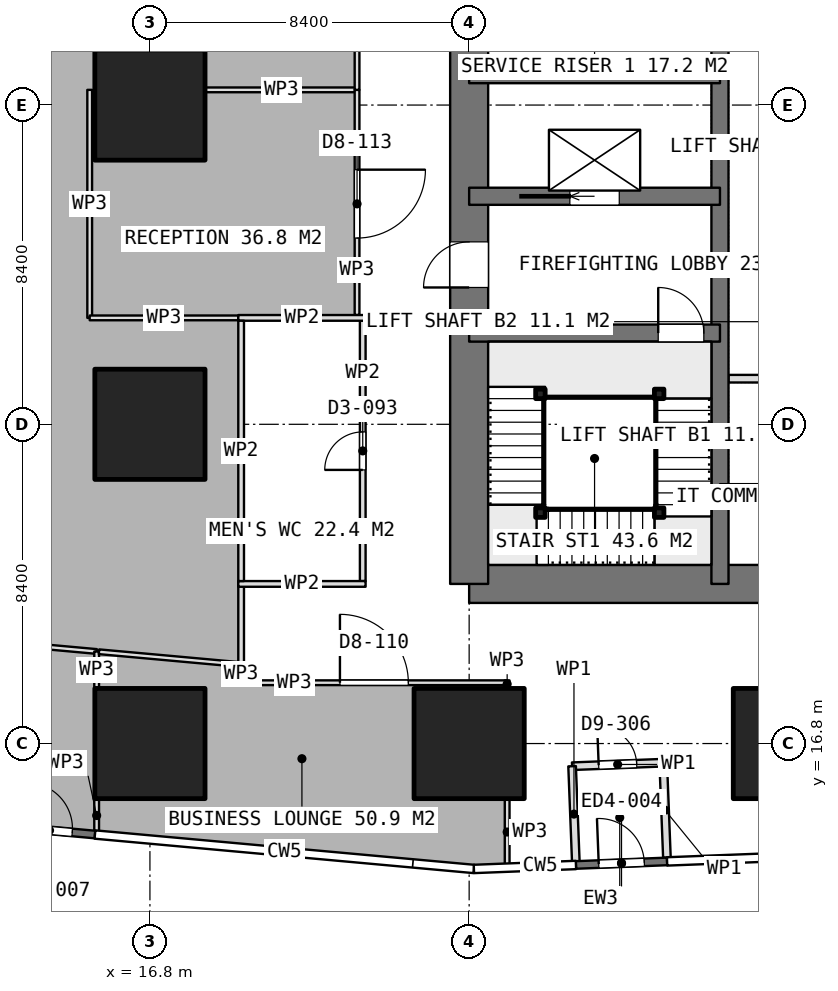
"""IFC4 building model, lengths in metres.
Left out: names, types, materials, properties, quantities, classifications, styles, units other than length and angle.
Written with IfcOpenShell. Run it as: python <this file> out.ifc"""

import sys

from ifc_helpers import new_model, si_unit, direction, frame, frame_2d, origin, origin_2d, place, context, subcontext, project, spatial, rectangle, extrude, element, fill, save


model = new_model("IFC4")
c1 = context("Model", 3, precision=1e-05, world=origin(), true_north=direction((0.0, 1.0)))
c2 = subcontext(c1, "Body", "Model", "MODEL_VIEW")
j1 = project(units=[si_unit("LENGTHUNIT", "METRE"), si_unit("PLANEANGLEUNIT", "RADIAN")], contexts=[c1])
p1 = place(None, origin())
s1 = spatial("IfcSite", under=j1, at=p1, CompositionType="ELEMENT")
p2 = place(p1, origin())
s2 = spatial("IfcBuilding", under=s1, at=p2, CompositionType="ELEMENT")
p3 = place(p2, frame((0.0, 0.0, 90.8)))
s3 = spatial("IfcBuildingStorey", under=s2, at=p3, CompositionType="ELEMENT", Elevation=90.8)
p4 = place(p3, frame((25.2, 21.0, 0.0), z_axis=(0.0, 0.0, 1.0), x_axis=(1.0, 0.0, 0.0)))
e1 = element("IfcWall", 1, at=p4, inside=s3, PredefinedType="SHEAR", context=c2, shape_type="SweptSolid", body=[
    extrude(rectangle(XDim=10.4, YDim=1.0, at=frame_2d((5.2, 0.0))), origin(), (0.0, 0.0, 1.0), 4.5),
])
p5 = place(p3, frame((25.2, 21.0, 0.0), z_axis=(0.0, 0.0, 1.0), x_axis=(0.0, 1.0, 0.0)))
e2 = element("IfcWall", 2, at=p5, inside=s3, PredefinedType="SHEAR", context=c2, shape_type="SweptSolid", body=[
    extrude(rectangle(XDim=25.2, YDim=1.0, at=frame_2d((12.6, 0.0))), origin(), (0.0, 0.0, 1.0), 4.5),
])
p6 = place(p5, frame((7.8, 0.0, 0.0)))
e3 = element("IfcOpeningElement", 3, at=p6, cuts=e2, PredefinedType="OPENING", context=c2, shape_type="SweptSolid", body=[
    extrude(rectangle(XDim=1.2, YDim=2.1, at=frame_2d((0.6, 1.05))), frame((0.0, 0.51, 0.0), z_axis=(0.0, -1.0, 0.0), x_axis=(1.0, 0.0, 0.0)), (0.0, 0.0, 1.0), 1.02),
])
p7 = place(p5, frame((14.25, 0.0, 0.0)))
e4 = element("IfcOpeningElement", 4, at=p7, cuts=e2, PredefinedType="OPENING", context=c2, shape_type="SweptSolid", body=[
    extrude(rectangle(XDim=0.9, YDim=2.1, at=frame_2d((0.45, 1.05))), frame((0.0, 0.51, 0.0), z_axis=(0.0, -1.0, 0.0), x_axis=(1.0, 0.0, 0.0)), (0.0, 0.0, 1.0), 1.02),
])
p8 = place(p5, frame((16.85, 0.0, 0.0)))
e5 = element("IfcOpeningElement", 5, at=p8, cuts=e2, PredefinedType="OPENING", context=c2, shape_type="SweptSolid", body=[
    extrude(rectangle(XDim=0.9, YDim=2.1, at=frame_2d((0.45, 1.05))), frame((0.0, 0.51, 0.0), z_axis=(0.0, -1.0, 0.0), x_axis=(1.0, 0.0, 0.0)), (0.0, 0.0, 1.0), 1.02),
])
p9 = place(p5, frame((19.025, 0.0, 0.0)))
e6 = element("IfcOpeningElement", 6, at=p9, cuts=e2, PredefinedType="OPENING", context=c2, shape_type="SweptSolid", body=[
    extrude(rectangle(XDim=1.2, YDim=2.1, at=frame_2d((0.6, 1.05))), frame((0.0, 0.51, 0.0), z_axis=(0.0, -1.0, 0.0), x_axis=(1.0, 0.0, 0.0)), (0.0, 0.0, 1.0), 1.02),
])
p10 = place(p3, frame((31.8, 21.0, 0.0), z_axis=(0.0, 0.0, 1.0), x_axis=(0.0, 1.0, 0.0)))
e7 = element("IfcWall", 7, at=p10, inside=s3, PredefinedType="SHEAR", context=c2, shape_type="SweptSolid", body=[
    extrude(rectangle(XDim=25.2, YDim=0.45, at=frame_2d((12.6, 0.0))), origin(), (0.0, 0.0, 1.0), 4.5),
])
p11 = place(p3, frame((31.8, 23.4, 0.0), z_axis=(0.0, 0.0, 1.0), x_axis=(1.0, 0.0, 0.0)))
e8 = element("IfcWall", 8, at=p11, inside=s3, PredefinedType="SHEAR", context=c2, shape_type="SweptSolid", body=[
    extrude(rectangle(XDim=3.8, YDim=0.45, at=frame_2d((1.9, 0.0))), origin(), (0.0, 0.0, 1.0), 4.5),
])
p12 = place(p3, frame((25.2, 27.6, 0.0), z_axis=(0.0, 0.0, 1.0), x_axis=(1.0, 0.0, 0.0)))
e9 = element("IfcWall", 9, at=p12, inside=s3, PredefinedType="SHEAR", context=c2, shape_type="SweptSolid", body=[
    extrude(rectangle(XDim=6.6, YDim=0.45, at=frame_2d((3.3, 0.0))), origin(), (0.0, 0.0, 1.0), 4.5),
])
p13 = place(p12, frame((4.975, 0.0, 0.0)))
e10 = element("IfcOpeningElement", 10, at=p13, cuts=e9, PredefinedType="OPENING", context=c2, shape_type="SweptSolid", body=[
    extrude(rectangle(XDim=1.2, YDim=2.1, at=frame_2d((0.6, 1.05))), frame((0.0, 0.235, 0.0), z_axis=(0.0, -1.0, 0.0), x_axis=(1.0, 0.0, 0.0)), (0.0, 0.0, 1.0), 0.47),
])
p14 = place(p3, frame((25.2, 31.2, 0.0), z_axis=(0.0, 0.0, 1.0), x_axis=(1.0, 0.0, 0.0)))
e11 = element("IfcWall", 11, at=p14, inside=s3, PredefinedType="SHEAR", context=c2, shape_type="SweptSolid", body=[
    extrude(rectangle(XDim=6.6, YDim=0.45, at=frame_2d((3.3, 0.0))), origin(), (0.0, 0.0, 1.0), 4.5),
])
p15 = place(p14, frame((2.65, 0.0, 0.0)))
e12 = element("IfcOpeningElement", 12, at=p15, cuts=e11, PredefinedType="OPENING", context=c2, shape_type="SweptSolid", body=[
    extrude(rectangle(XDim=1.3, YDim=2.1, at=frame_2d((0.65, 1.05))), frame((0.0, 0.235, 0.0), z_axis=(0.0, -1.0, 0.0), x_axis=(1.0, 0.0, 0.0)), (0.0, 0.0, 1.0), 0.47),
])
p16 = place(p3, frame((25.2, 34.4, 0.0), z_axis=(0.0, 0.0, 1.0), x_axis=(1.0, 0.0, 0.0)))
e13 = element("IfcWall", 13, at=p16, inside=s3, PredefinedType="SHEAR", context=c2, shape_type="SweptSolid", body=[
    extrude(rectangle(XDim=6.6, YDim=0.45, at=frame_2d((3.3, 0.0))), origin(), (0.0, 0.0, 1.0), 4.5),
])
for number, where, z_axis, x_axis in (
    (14, (16.8, 16.8, 0.0), (0.0, 0.0, 1.0), (1.0, 0.0, 0.0)),
    (15, (16.8, 25.2, 0.0), (0.0, 0.0, 1.0), (1.0, 0.0, 0.0)),
    (16, (16.8, 33.6, 0.0), (0.0, 0.0, 1.0), (1.0, 0.0, 0.0)),
    (17, (25.2, 16.8, 0.0), (0.0, 0.0, 1.0), (1.0, 0.0, 0.0)),
    (18, (33.6, 16.8, 0.0), (0.0, 0.0, 1.0), (1.0, 0.0, 0.0)),
):
    element("IfcColumn", number, at=place(p3, frame(where, z_axis=z_axis, x_axis=x_axis)), inside=s3, PredefinedType="COLUMN", context=c2, shape_type="SweptSolid", body=[
        extrude(rectangle(XDim=2.9, YDim=2.9, at=origin_2d()), origin(), (0.0, 0.0, 1.0), 4.5),
    ])
p17 = place(p3, frame((11.171, 14.786, 0.0), z_axis=(0.0, 0.0, 1.0), x_axis=(0.995906536502, -0.090388995754, 0.0)))
e19 = element("IfcWall", 19, at=p17, inside=s3, PredefinedType="SOLIDWALL", context=c2, shape_type="SweptSolid", body=[
    extrude(rectangle(XDim=4.2, YDim=0.2, at=frame_2d((2.1, 0.0))), origin(), (0.0, 0.0, 1.0), 4.25),
])
p18 = place(p17, frame((0.6, 0.0, 0.0)))
e20 = element("IfcOpeningElement", 20, at=p18, cuts=e19, PredefinedType="OPENING", context=c2, shape_type="SweptSolid", body=[
    extrude(rectangle(XDim=1.2, YDim=2.4, at=frame_2d((0.6, 1.2))), frame((0.0, 0.11, 0.0), z_axis=(0.0, -1.0, 0.0), x_axis=(1.0, 0.0, 0.0)), (0.0, 0.0, 1.0), 0.22),
])
p19 = place(p17, frame((2.4, 0.0, 0.0)))
e21 = element("IfcOpeningElement", 21, at=p19, cuts=e19, PredefinedType="OPENING", context=c2, shape_type="SweptSolid", body=[
    extrude(rectangle(XDim=1.2, YDim=2.4, at=frame_2d((0.6, 1.2))), frame((0.0, 0.11, 0.0), z_axis=(0.0, -1.0, 0.0), x_axis=(1.0, 0.0, 0.0)), (0.0, 0.0, 1.0), 0.22),
])
p20 = place(p3, frame((28.01, 13.605, 0.0), z_axis=(0.0, 0.0, 1.0), x_axis=(0.999240750633, 0.038960521988, 0.0)))
e22 = element("IfcWall", 22, at=p20, inside=s3, PredefinedType="SOLIDWALL", context=c2, shape_type="SweptSolid", body=[
    extrude(rectangle(XDim=2.4, YDim=0.2, at=frame_2d((1.2, 0.0))), origin(), (0.0, 0.0, 1.0), 4.25),
])
p21 = place(p20, frame((0.6, 0.0, 0.0)))
e23 = element("IfcOpeningElement", 23, at=p21, cuts=e22, PredefinedType="OPENING", context=c2, shape_type="SweptSolid", body=[
    extrude(rectangle(XDim=1.2, YDim=2.4, at=frame_2d((0.6, 1.2))), frame((0.0, 0.11, 0.0), z_axis=(0.0, -1.0, 0.0), x_axis=(1.0, 0.0, 0.0)), (0.0, 0.0, 1.0), 0.22),
])
for number, where, z_axis, x_axis in (
    (24, (32.025, 26.4, 0.0), (0.0, 0.0, 1.0), (1.0, 0.0, 0.0)),
    (25, (32.025, 29.4, 0.0), (0.0, 0.0, 1.0), (1.0, 0.0, 0.0)),
    (26, (32.025, 32.4, 0.0), (0.0, 0.0, 1.0), (1.0, 0.0, 0.0)),
):
    element("IfcWall", number, at=place(p3, frame(where, z_axis=z_axis, x_axis=x_axis)), inside=s3, PredefinedType="PARTITIONING", context=c2, shape_type="SweptSolid", body=[
        extrude(rectangle(XDim=3.075, YDim=0.2, at=frame_2d((1.538, 0.0))), origin(), (0.0, 0.0, 1.0), 4.25),
    ])
for number, where, z_axis, x_axis in (
    (27, (19.125, 21.0, 0.0), (0.0, 0.0, 1.0), (1.0, 0.0, 0.0)),
    (28, (19.125, 28.0, 0.0), (0.0, 0.0, 1.0), (1.0, 0.0, 0.0)),
):
    element("IfcWall", number, at=place(p3, frame(where, z_axis=z_axis, x_axis=x_axis)), inside=s3, PredefinedType="PARTITIONING", context=c2, shape_type="SweptSolid", body=[
        extrude(rectangle(XDim=3.35, YDim=0.15, at=frame_2d((1.675, 0.0))), origin(), (0.0, 0.0, 1.0), 4.25),
    ])
p22 = place(p3, frame((19.2, 21.075, 0.0), z_axis=(0.0, 0.0, 1.0), x_axis=(0.0, 1.0, 0.0)))
e29 = element("IfcWall", 29, at=p22, inside=s3, PredefinedType="PARTITIONING", context=c2, shape_type="SweptSolid", body=[
    extrude(rectangle(XDim=6.85, YDim=0.15, at=frame_2d((3.425, 0.0))), origin(), (0.0, 0.0, 1.0), 4.25),
])
p23 = place(p3, frame((22.4, 21.075, 0.0), z_axis=(0.0, 0.0, 1.0), x_axis=(0.0, 1.0, 0.0)))
e30 = element("IfcWall", 30, at=p23, inside=s3, PredefinedType="PARTITIONING", context=c2, shape_type="SweptSolid", body=[
    extrude(rectangle(XDim=6.85, YDim=0.15, at=frame_2d((3.425, 0.0))), origin(), (0.0, 0.0, 1.0), 4.25),
])
p24 = place(p23, frame((2.925, 0.0, 0.0)))
e31 = element("IfcOpeningElement", 31, at=p24, cuts=e30, PredefinedType="OPENING", context=c2, shape_type="SweptSolid", body=[
    extrude(rectangle(XDim=1.0, YDim=2.1, at=frame_2d((0.5, 1.05))), frame((0.0, 0.085, 0.0), z_axis=(0.0, -1.0, 0.0), x_axis=(1.0, 0.0, 0.0)), (0.0, 0.0, 1.0), 0.17),
])
p25 = place(p3, frame((10.998, 19.621, 0.0), z_axis=(0.0, 0.0, 1.0), x_axis=(0.995909948824, -0.090351390874, 0.0)))
e32 = element("IfcWall", 32, at=p25, inside=s3, PredefinedType="PARTITIONING", context=c2, shape_type="SweptSolid", body=[
    extrude(rectangle(XDim=4.418, YDim=0.125, at=frame_2d((2.209, 0.0))), origin(), (0.0, 0.0, 1.0), 4.25),
])
p26 = place(p3, frame((15.398, 19.222, 0.0), z_axis=(0.0, 0.0, 1.0), x_axis=(0.0, -1.0, 0.0)))
e33 = element("IfcWall", 33, at=p26, inside=s3, PredefinedType="PARTITIONING", context=c2, shape_type="SweptSolid", body=[
    extrude(rectangle(XDim=0.952, YDim=0.125, at=frame_2d((0.476, 0.0))), origin(), (0.0, 0.0, 1.0), 4.25),
])
p27 = place(p3, frame((15.398, 15.33, 0.0), z_axis=(0.0, 0.0, 1.0), x_axis=(0.0, -1.0, 0.0)))
e34 = element("IfcWall", 34, at=p27, inside=s3, PredefinedType="PARTITIONING", context=c2, shape_type="SweptSolid", body=[
    extrude(rectangle(XDim=0.848, YDim=0.125, at=frame_2d((0.424, 0.0))), origin(), (0.0, 0.0, 1.0), 4.25),
])
p28 = place(p3, frame((15.46, 19.215, 0.0), z_axis=(0.0, 0.0, 1.0), x_axis=(0.995914494184, -0.090301275045, 0.0)))
e35 = element("IfcWall", 35, at=p28, inside=s3, PredefinedType="PARTITIONING", context=c2, shape_type="SweptSolid", body=[
    extrude(rectangle(XDim=3.755, YDim=0.125, at=frame_2d((1.878, 0.0))), origin(), (0.0, 0.0, 1.0), 4.25),
])
p29 = place(p3, frame((19.2, 18.876, 0.0), z_axis=(0.0, 0.0, 1.0), x_axis=(0.0, -1.0, 0.0)))
e36 = element("IfcWall", 36, at=p29, inside=s3, PredefinedType="PARTITIONING", context=c2, shape_type="SweptSolid", body=[
    extrude(rectangle(XDim=0.476, YDim=0.125, at=frame_2d((0.238, 0.0))), origin(), (0.0, 0.0, 1.0), 4.25),
])
p30 = place(p3, frame((19.2, 18.4, 0.0), z_axis=(0.0, 0.0, 1.0), x_axis=(1.0, 0.0, 0.0)))
e37 = element("IfcWall", 37, at=p30, inside=s3, PredefinedType="PARTITIONING", context=c2, shape_type="SweptSolid", body=[
    extrude(rectangle(XDim=7.0, YDim=0.125, at=frame_2d((3.5, 0.0))), origin(), (0.0, 0.0, 1.0), 4.25),
])
p31 = place(p30, frame((2.6, 0.0, 0.0)))
e38 = element("IfcOpeningElement", 38, at=p31, cuts=e37, PredefinedType="OPENING", context=c2, shape_type="SweptSolid", body=[
    extrude(rectangle(XDim=1.8, YDim=2.1, at=frame_2d((0.9, 1.05))), frame((0.0, 0.073, 0.0), z_axis=(0.0, -1.0, 0.0), x_axis=(1.0, 0.0, 0.0)), (0.0, 0.0, 1.0), 0.145),
])
p32 = place(p3, frame((26.2, 15.33, 0.0), z_axis=(0.0, 0.0, 1.0), x_axis=(0.0, -1.0, 0.0)))
e39 = element("IfcWall", 39, at=p32, inside=s3, PredefinedType="PARTITIONING", context=c2, shape_type="SweptSolid", body=[
    extrude(rectangle(XDim=1.716, YDim=0.125, at=frame_2d((0.858, 0.0))), origin(), (0.0, 0.0, 1.0), 4.25),
])
p33 = place(p3, frame((15.215, 28.0, 0.0), z_axis=(0.0, 0.0, 1.0), x_axis=(0.0, 1.0, 0.0)))
e40 = element("IfcWall", 40, at=p33, inside=s3, PredefinedType="PARTITIONING", context=c2, shape_type="SweptSolid", body=[
    extrude(rectangle(XDim=6.0, YDim=0.125, at=frame_2d((3.0, 0.0))), origin(), (0.0, 0.0, 1.0), 4.25),
])
p34 = place(p3, frame((18.27, 34.0, 0.0), z_axis=(0.0, 0.0, 1.0), x_axis=(1.0, 0.0, 0.0)))
e41 = element("IfcWall", 41, at=p34, inside=s3, PredefinedType="PARTITIONING", context=c2, shape_type="SweptSolid", body=[
    extrude(rectangle(XDim=3.98, YDim=0.125, at=frame_2d((1.99, 0.0))), origin(), (0.0, 0.0, 1.0), 4.25),
])
p35 = place(p3, frame((22.25, 34.0, 0.0), z_axis=(0.0, 0.0, 1.0), x_axis=(0.0, -1.0, 0.0)))
e42 = element("IfcWall", 42, at=p35, inside=s3, PredefinedType="PARTITIONING", context=c2, shape_type="SweptSolid", body=[
    extrude(rectangle(XDim=5.925, YDim=0.125, at=frame_2d((2.962, 0.0))), origin(), (0.0, 0.0, 1.0), 4.25),
])
p36 = place(p35, frame((2.1, 0.0, 0.0)))
e43 = element("IfcOpeningElement", 43, at=p36, cuts=e42, PredefinedType="OPENING", context=c2, shape_type="SweptSolid", body=[
    extrude(rectangle(XDim=1.8, YDim=2.1, at=frame_2d((0.9, 1.05))), frame((0.0, 0.073, 0.0), z_axis=(0.0, -1.0, 0.0), x_axis=(1.0, 0.0, 0.0)), (0.0, 0.0, 1.0), 0.145),
])
p37 = place(p3, frame((19.125, 28.0, 0.0), z_axis=(0.0, 0.0, 1.0), x_axis=(-1.0, 0.0, 0.0)))
e44 = element("IfcWall", 44, at=p37, inside=s3, PredefinedType="PARTITIONING", context=c2, shape_type="SweptSolid", body=[
    extrude(rectangle(XDim=3.91, YDim=0.125, at=frame_2d((1.955, 0.0))), origin(), (0.0, 0.0, 1.0), 4.25),
])
p38 = place(p3, frame((22.25, 37.0, 0.0), z_axis=(0.0, 0.0, 1.0), x_axis=(0.0, -1.0, 0.0)))
e45 = element("IfcWall", 45, at=p38, inside=s3, PredefinedType="PARTITIONING", context=c2, shape_type="SweptSolid", body=[
    extrude(rectangle(XDim=3.0, YDim=0.125, at=frame_2d((1.5, 0.0))), origin(), (0.0, 0.0, 1.0), 4.25),
])
p39 = place(p3, frame((19.2, 21.075, 0.0), z_axis=(0.0, 0.0, 1.0), x_axis=(0.0, -1.0, 0.0)))
e46 = element("IfcWall", 46, at=p39, inside=s3, PredefinedType="PARTITIONING", context=c2, shape_type="SweptSolid", body=[
    extrude(rectangle(XDim=2.199, YDim=0.15, at=frame_2d((1.1, 0.0))), origin(), (0.0, 0.0, 1.0), 4.25),
])
p40 = place(p3, frame((27.909, 16.203, 0.0), z_axis=(0.0, 0.0, 1.0), x_axis=(0.999248497687, 0.038761319244, 0.0)))
e47 = element("IfcWall", 47, at=p40, inside=s3, PredefinedType="PARTITIONING", context=c2, shape_type="SweptSolid", body=[
    extrude(rectangle(XDim=2.4, YDim=0.2, at=frame_2d((1.2, 0.0))), origin(), (0.0, 0.0, 1.0), 4.25),
])
p41 = place(p40, frame((0.7, 0.0, 0.0)))
e48 = element("IfcOpeningElement", 48, at=p41, cuts=e47, PredefinedType="OPENING", context=c2, shape_type="SweptSolid", body=[
    extrude(rectangle(XDim=1.0, YDim=2.1, at=frame_2d((0.5, 1.05))), frame((0.0, 0.11, 0.0), z_axis=(0.0, -1.0, 0.0), x_axis=(1.0, 0.0, 0.0)), (0.0, 0.0, 1.0), 0.22),
])
p42 = place(p3, frame((30.307, 16.296, 0.0), z_axis=(0.0, 0.0, 1.0), x_axis=(0.038871976468, -0.999244199105, 0.0)))
e49 = element("IfcWall", 49, at=p42, inside=s3, PredefinedType="PARTITIONING", context=c2, shape_type="SweptSolid", body=[
    extrude(rectangle(XDim=2.5, YDim=0.2, at=frame_2d((1.25, 0.0))), origin(), (0.0, 0.0, 1.0), 4.25),
])
p43 = place(p3, frame((28.007, 13.684, 0.0), z_axis=(0.0, 0.0, 1.0), x_axis=(-0.038935269694, 0.999241734904, 0.0)))
e50 = element("IfcWall", 50, at=p43, inside=s3, PredefinedType="PARTITIONING", context=c2, shape_type="SweptSolid", body=[
    extrude(rectangle(XDim=2.521, YDim=0.2, at=frame_2d((1.26, 0.0))), origin(), (0.0, 0.0, 1.0), 4.25),
])
p44 = place(p3, frame((26.2, 18.462, 0.0), z_axis=(0.0, 0.0, 1.0), x_axis=(0.0, -1.0, 0.0)))
e51 = element("IfcWall", 51, at=p44, inside=s3, PredefinedType="PARTITIONING", context=c2, shape_type="SweptSolid", body=[
    extrude(rectangle(XDim=0.192, YDim=0.125, at=frame_2d((0.096, 0.0))), origin(), (0.0, 0.0, 1.0), 4.25),
])
for number, where, z_axis, x_axis in (
    (52, (30.2, 26.0, 0.0), (0.0, 0.0, 1.0), (1.0, 0.0, 0.0)),
    (53, (30.2, 22.875, 0.0), (0.0, 0.0, 1.0), (1.0, 0.0, 0.0)),
    (54, (27.075, 22.875, 0.0), (0.0, 0.0, 1.0), (1.0, 0.0, 0.0)),
    (55, (27.075, 26.0, 0.0), (0.0, 0.0, 1.0), (1.0, 0.0, 0.0)),
):
    element("IfcColumn", number, at=place(p3, frame(where, z_axis=z_axis, x_axis=x_axis)), inside=s3, PredefinedType="COLUMN", context=c2, shape_type="SweptSolid", body=[
        extrude(rectangle(XDim=0.25, YDim=0.25, at=origin_2d()), origin(), (0.0, 0.0, 1.0), 4.5),
    ])
p45 = place(p19, origin())
e56 = element("IfcDoor", 56, at=p45, inside=s3, OperationType="SINGLE_SWING_LEFT", PredefinedType="DOOR", context=c2, shape_type="SweptSolid", body=[
    extrude(rectangle(XDim=1.2, YDim=2.4, at=frame_2d((0.6, 1.2))), frame((0.0, 0.025, 0.0), z_axis=(0.0, -1.0, 0.0), x_axis=(1.0, 0.0, 0.0)), (0.0, 0.0, 1.0), 0.05),
])
fill(e21, e56)
p46 = place(p21, origin())
e57 = element("IfcDoor", 57, at=p46, inside=s3, OperationType="SINGLE_SWING_LEFT", PredefinedType="DOOR", context=c2, shape_type="SweptSolid", body=[
    extrude(rectangle(XDim=1.2, YDim=2.4, at=frame_2d((0.6, 1.2))), frame((0.0, 0.025, 0.0), z_axis=(0.0, -1.0, 0.0), x_axis=(1.0, 0.0, 0.0)), (0.0, 0.0, 1.0), 0.05),
])
fill(e23, e57)
p47 = place(p6, origin())
e58 = element("IfcDoor", 58, at=p47, inside=s3, OperationType="SINGLE_SWING_LEFT", PredefinedType="DOOR", context=c2, shape_type="SweptSolid", body=[
    extrude(rectangle(XDim=1.2, YDim=2.1, at=frame_2d((0.6, 1.05))), frame((0.0, 0.025, 0.0), z_axis=(0.0, -1.0, 0.0), x_axis=(1.0, 0.0, 0.0)), (0.0, 0.0, 1.0), 0.05),
])
fill(e3, e58)
p48 = place(p15, origin())
e59 = element("IfcDoor", 59, at=p48, inside=s3, OperationType="SLIDING_TO_LEFT", PredefinedType="USERDEFINED", context=c2, shape_type="SweptSolid", body=[
    extrude(rectangle(XDim=1.3, YDim=2.1, at=frame_2d((0.65, 1.05))), frame((0.0, 0.025, 0.0), z_axis=(0.0, -1.0, 0.0), x_axis=(1.0, 0.0, 0.0)), (0.0, 0.0, 1.0), 0.05),
])
fill(e12, e59)
p49 = place(p24, origin())
e60 = element("IfcDoor", 60, at=p49, inside=s3, OperationType="SINGLE_SWING_LEFT", PredefinedType="DOOR", context=c2, shape_type="SweptSolid", body=[
    extrude(rectangle(XDim=1.0, YDim=2.1, at=frame_2d((0.5, 1.05))), frame((0.0, 0.025, 0.0), z_axis=(0.0, -1.0, 0.0), x_axis=(1.0, 0.0, 0.0)), (0.0, 0.0, 1.0), 0.05),
])
fill(e31, e60)
p50 = place(p31, origin())
e61 = element("IfcDoor", 61, at=p50, inside=s3, OperationType="DOUBLE_DOOR_SINGLE_SWING", PredefinedType="DOOR", context=c2, shape_type="SweptSolid", body=[
    extrude(rectangle(XDim=1.8, YDim=2.1, at=frame_2d((0.9, 1.05))), frame((0.0, 0.025, 0.0), z_axis=(0.0, -1.0, 0.0), x_axis=(1.0, 0.0, 0.0)), (0.0, 0.0, 1.0), 0.05),
])
fill(e38, e61)
p51 = place(p36, origin())
e62 = element("IfcDoor", 62, at=p51, inside=s3, OperationType="DOUBLE_DOOR_SINGLE_SWING", PredefinedType="DOOR", context=c2, shape_type="SweptSolid", body=[
    extrude(rectangle(XDim=1.8, YDim=2.1, at=frame_2d((0.9, 1.05))), frame((0.0, 0.025, 0.0), z_axis=(0.0, -1.0, 0.0), x_axis=(1.0, 0.0, 0.0)), (0.0, 0.0, 1.0), 0.05),
])
fill(e43, e62)
p52 = place(p41, origin())
e63 = element("IfcDoor", 63, at=p52, inside=s3, OperationType="SINGLE_SWING_LEFT", PredefinedType="DOOR", context=c2, shape_type="SweptSolid", body=[
    extrude(rectangle(XDim=1.0, YDim=2.1, at=frame_2d((0.5, 1.05))), frame((0.0, 0.025, 0.0), z_axis=(0.0, -1.0, 0.0), x_axis=(1.0, 0.0, 0.0)), (0.0, 0.0, 1.0), 0.05),
])
fill(e48, e63)
p53 = place(p13, origin())
e64 = element("IfcDoor", 64, at=p53, inside=s3, OperationType="SINGLE_SWING_RIGHT", PredefinedType="DOOR", context=c2, shape_type="SweptSolid", body=[
    extrude(rectangle(XDim=1.2, YDim=2.1, at=frame_2d((0.6, 1.05))), frame((0.0, 0.025, 0.0), z_axis=(0.0, -1.0, 0.0), x_axis=(1.0, 0.0, 0.0)), (0.0, 0.0, 1.0), 0.05),
])
fill(e10, e64)
save(model, sys.argv[1])
